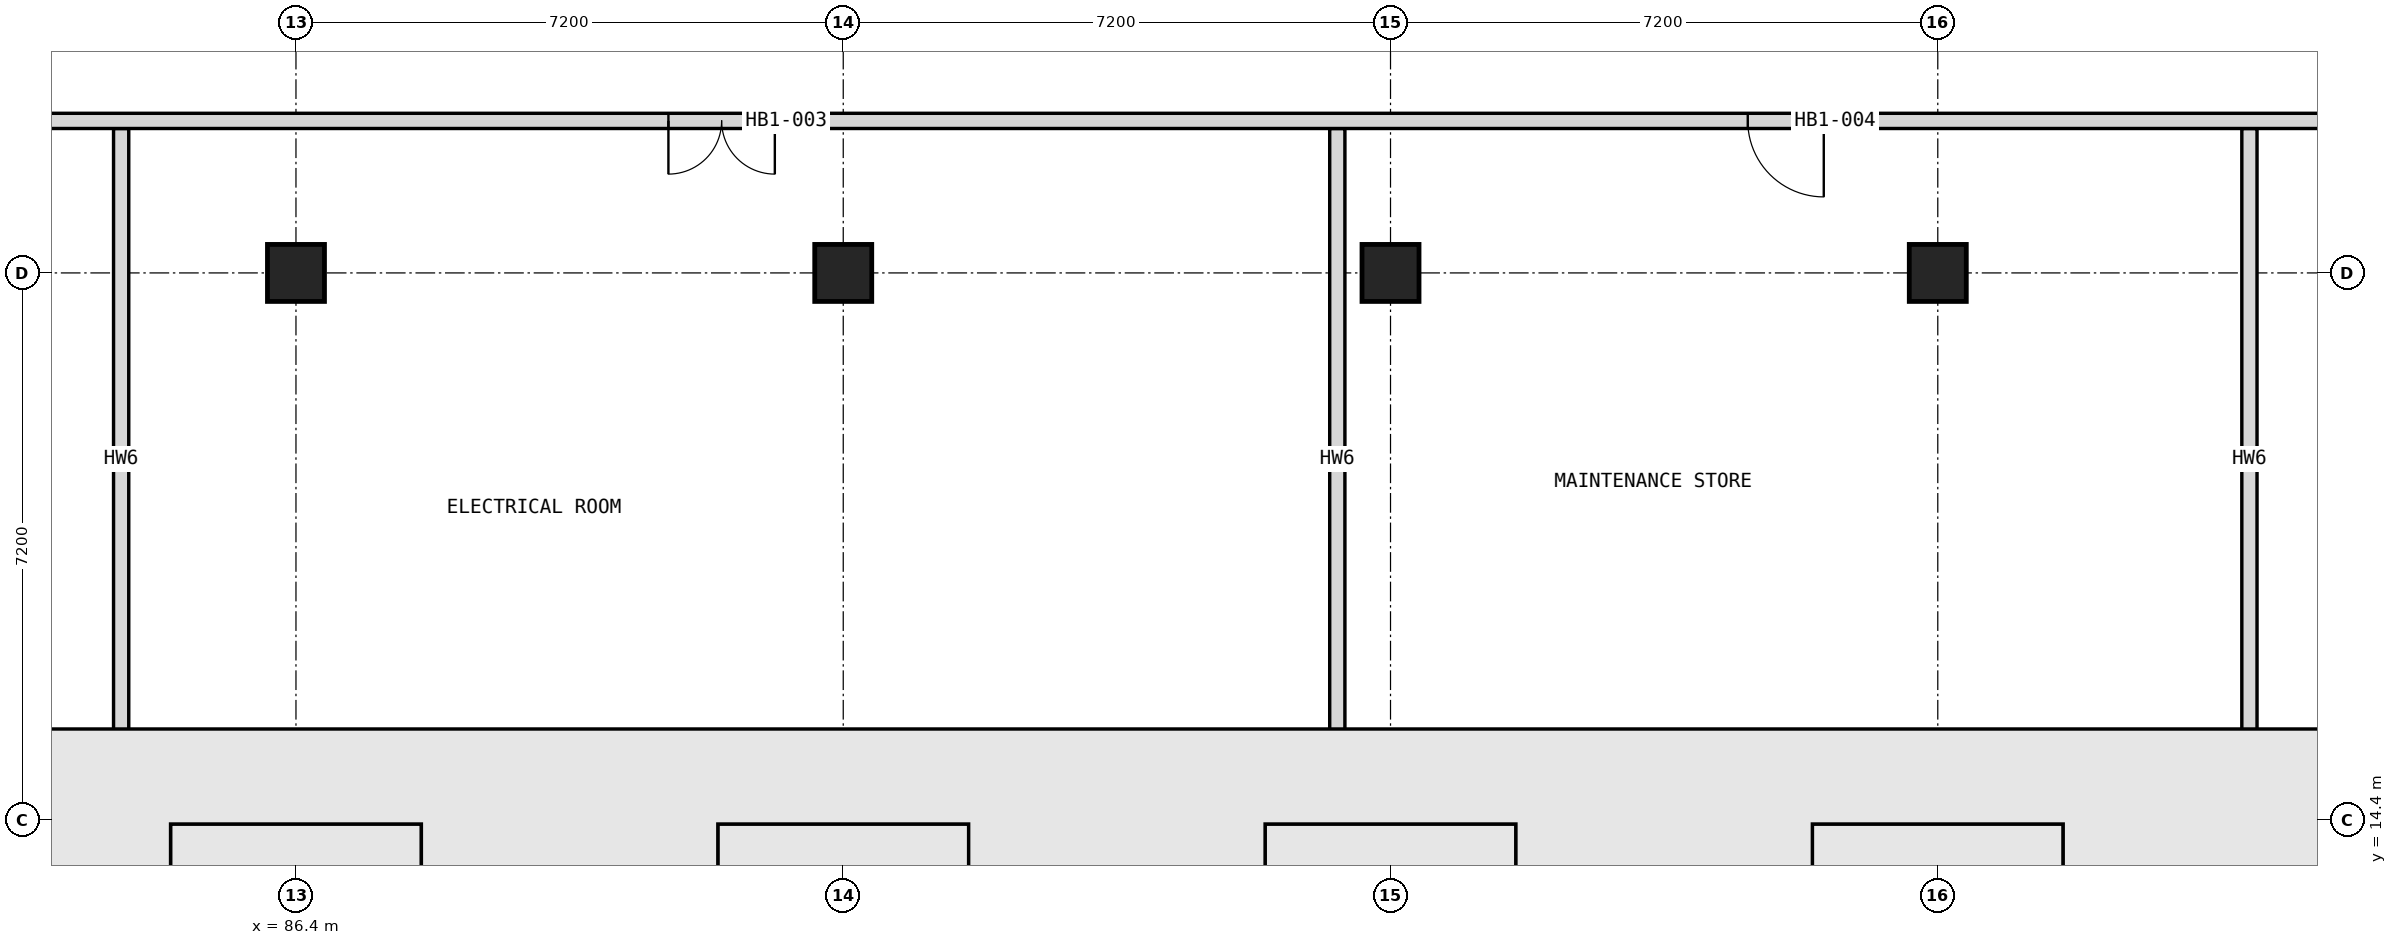
"""IFC4 building model, lengths in metres.
Left out: names, types, materials, properties, quantities, classifications, styles, units other than length and angle.
Written with IfcOpenShell. Run it as: python <this file> out.ifc"""

import sys

from ifc_helpers import new_model, si_unit, direction, frame, frame_2d, origin, origin_2d, place, context, subcontext, project, spatial, rectangle, extrude, element, fill, save


model = new_model("IFC4")
c1 = context("Model", 3, precision=1e-05, world=origin(), true_north=direction((0.0, 1.0)))
c2 = subcontext(c1, "Body", "Model", "MODEL_VIEW")
j1 = project(units=[si_unit("LENGTHUNIT", "METRE"), si_unit("PLANEANGLEUNIT", "RADIAN")], contexts=[c1])
p1 = place(None, origin())
s1 = spatial("IfcSite", under=j1, at=p1, CompositionType="ELEMENT")
p2 = place(p1, origin())
s2 = spatial("IfcBuilding", under=s1, at=p2, CompositionType="ELEMENT")
p3 = place(p2, frame((0.0, 0.0, -8.0)))
s3 = spatial("IfcBuildingStorey", under=s2, at=p3, CompositionType="ELEMENT", Elevation=-8.0)
p4 = place(p3, frame((13.9, 14.4, 0.0), z_axis=(0.0, 0.0, 1.0), x_axis=(1.0, 0.0, 0.0)))
e1 = element("IfcWall", 1, at=p4, inside=s3, PredefinedType="SOLIDWALL", context=c2, shape_type="SweptSolid", body=[
    extrude(rectangle(XDim=130.6, YDim=0.8, at=frame_2d((65.3, 0.0))), origin(), (0.0, 0.0, 1.0), 8.0),
])
for number, where, z_axis, x_axis in (
    (2, (86.4, 11.4, -0.8), (0.0, 0.0, 1.0), (0.0, 1.0, 0.0)),
    (3, (93.6, 11.4, -0.8), (0.0, 0.0, 1.0), (0.0, 1.0, 0.0)),
    (4, (100.8, 11.4, -0.8), (0.0, 0.0, 1.0), (0.0, 1.0, 0.0)),
    (5, (108.0, 11.4, -0.8), (0.0, 0.0, 1.0), (0.0, 1.0, 0.0)),
):
    element("IfcWall", number, at=place(p3, frame(where, z_axis=z_axis, x_axis=x_axis)), inside=s3, PredefinedType="SOLIDWALL", context=c2, shape_type="SweptSolid", body=[
        extrude(rectangle(XDim=2.6, YDim=1.0, at=frame_2d((1.3, 0.0))), origin(), (0.0, 0.0, 1.0), 8.8),
    ])
for number, where, z_axis, x_axis in (
    (6, (86.4, 21.6, 0.0), (0.0, 0.0, 1.0), (1.0, 0.0, 0.0)),
    (7, (93.6, 21.6, 0.0), (0.0, 0.0, 1.0), (1.0, 0.0, 0.0)),
    (8, (100.8, 21.6, 0.0), (0.0, 0.0, 1.0), (1.0, 0.0, 0.0)),
    (9, (108.0, 21.6, 0.0), (0.0, 0.0, 1.0), (1.0, 0.0, 0.0)),
):
    element("IfcColumn", number, at=place(p3, frame(where, z_axis=z_axis, x_axis=x_axis)), inside=s3, PredefinedType="COLUMN", context=c2, shape_type="SweptSolid", body=[
        extrude(rectangle(XDim=0.75, YDim=0.75, at=origin_2d()), origin(), (0.0, 0.0, 1.0), 7.595),
    ])
for number, where, z_axis, x_axis in (
    (10, (84.1, 14.8, 0.0), (0.0, 0.0, 1.0), (0.0, 1.0, 0.0)),
    (11, (100.1, 14.8, 0.0), (0.0, 0.0, 1.0), (0.0, 1.0, 0.0)),
    (12, (112.1, 14.8, 0.0), (0.0, 0.0, 1.0), (0.0, 1.0, 0.0)),
):
    element("IfcWall", number, at=place(p3, frame(where, z_axis=z_axis, x_axis=x_axis)), inside=s3, PredefinedType="PARTITIONING", context=c2, shape_type="SweptSolid", body=[
        extrude(rectangle(XDim=8.7, YDim=0.2, at=frame_2d((4.35, 0.0))), origin(), (0.0, 0.0, 1.0), 7.595),
    ])
p5 = place(p3, frame((26.15, 23.6, 0.0), z_axis=(0.0, 0.0, 1.0), x_axis=(1.0, 0.0, 0.0)))
e13 = element("IfcWall", 13, at=p5, inside=s3, PredefinedType="PARTITIONING", context=c2, shape_type="SweptSolid", body=[
    extrude(rectangle(XDim=106.25, YDim=0.2, at=frame_2d((53.125, 0.0))), origin(), (0.0, 0.0, 1.0), 7.595),
])
p6 = place(p5, frame((19.65, 0.0, 0.0)))
e14 = element("IfcOpeningElement", 14, at=p6, cuts=e13, PredefinedType="OPENING", context=c2, shape_type="SweptSolid", body=[
    extrude(rectangle(XDim=2.4, YDim=2.4, at=frame_2d((1.2, 1.2))), frame((0.0, 0.11, 0.0), z_axis=(0.0, -1.0, 0.0), x_axis=(1.0, 0.0, 0.0)), (0.0, 0.0, 1.0), 0.22),
])
p7 = place(p5, frame((42.65, 0.0, 0.0)))
e15 = element("IfcOpeningElement", 15, at=p7, cuts=e13, PredefinedType="OPENING", context=c2, shape_type="SweptSolid", body=[
    extrude(rectangle(XDim=2.4, YDim=2.4, at=frame_2d((1.2, 1.2))), frame((0.0, 0.11, 0.0), z_axis=(0.0, -1.0, 0.0), x_axis=(1.0, 0.0, 0.0)), (0.0, 0.0, 1.0), 0.22),
])
p8 = place(p5, frame((65.15, 0.0, 0.0)))
e16 = element("IfcOpeningElement", 16, at=p8, cuts=e13, PredefinedType="OPENING", context=c2, shape_type="SweptSolid", body=[
    extrude(rectangle(XDim=1.4, YDim=2.1, at=frame_2d((0.7, 1.05))), frame((0.0, 0.11, 0.0), z_axis=(0.0, -1.0, 0.0), x_axis=(1.0, 0.0, 0.0)), (0.0, 0.0, 1.0), 0.22),
])
p9 = place(p5, frame((79.35, 0.0, 0.0)))
e17 = element("IfcOpeningElement", 17, at=p9, cuts=e13, PredefinedType="OPENING", context=c2, shape_type="SweptSolid", body=[
    extrude(rectangle(XDim=1.0, YDim=2.1, at=frame_2d((0.5, 1.05))), frame((0.0, 0.11, 0.0), z_axis=(0.0, -1.0, 0.0), x_axis=(1.0, 0.0, 0.0)), (0.0, 0.0, 1.0), 0.22),
])
p10 = place(p5, frame((93.35, 0.0, 0.0)))
e18 = element("IfcOpeningElement", 18, at=p10, cuts=e13, PredefinedType="OPENING", context=c2, shape_type="SweptSolid", body=[
    extrude(rectangle(XDim=1.0, YDim=2.1, at=frame_2d((0.5, 1.05))), frame((0.0, 0.11, 0.0), z_axis=(0.0, -1.0, 0.0), x_axis=(1.0, 0.0, 0.0)), (0.0, 0.0, 1.0), 0.22),
])
p11 = place(p8, frame((1.4, 0.0, 0.0), z_axis=(0.0, 0.0, 1.0), x_axis=(-1.0, 0.0, 0.0)))
e19 = element("IfcDoor", 19, at=p11, inside=s3, OperationType="DOUBLE_DOOR_SINGLE_SWING", PredefinedType="DOOR", context=c2, shape_type="SweptSolid", body=[
    extrude(rectangle(XDim=1.4, YDim=2.1, at=frame_2d((0.7, 1.05))), frame((0.0, 0.025, 0.0), z_axis=(0.0, -1.0, 0.0), x_axis=(1.0, 0.0, 0.0)), (0.0, 0.0, 1.0), 0.05),
])
fill(e16, e19)
p12 = place(p9, frame((1.0, 0.0, 0.0), z_axis=(0.0, 0.0, 1.0), x_axis=(-1.0, 0.0, 0.0)))
e20 = element("IfcDoor", 20, at=p12, inside=s3, OperationType="SINGLE_SWING_LEFT", PredefinedType="DOOR", context=c2, shape_type="SweptSolid", body=[
    extrude(rectangle(XDim=1.0, YDim=2.1, at=frame_2d((0.5, 1.05))), frame((0.0, 0.025, 0.0), z_axis=(0.0, -1.0, 0.0), x_axis=(1.0, 0.0, 0.0)), (0.0, 0.0, 1.0), 0.05),
])
fill(e17, e20)
save(model, sys.argv[1])
